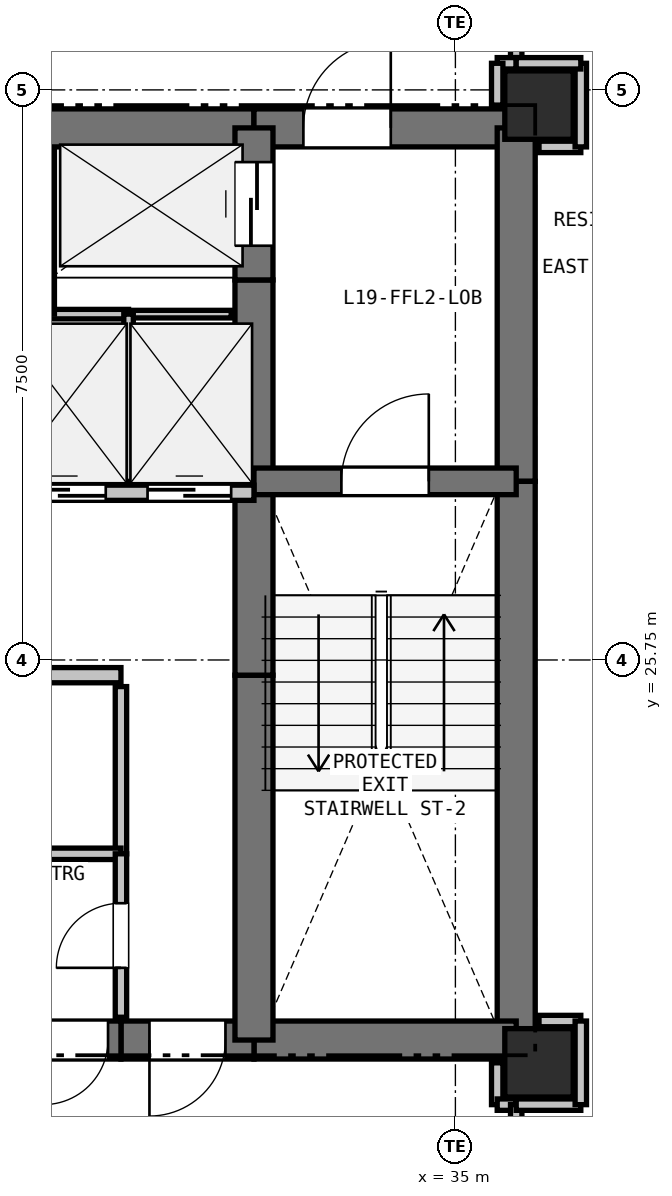
"""IFC4 building model, lengths in metres.
Left out: names, types, materials, properties, quantities, classifications, styles, units other than length and angle.
Written with IfcOpenShell. Run it as: python <this file> out.ifc"""

import sys

from ifc_helpers import new_model, si_unit, direction, frame, frame_2d, origin, origin_2d, place, context, subcontext, project, spatial, rectangle, extrude, element, fill, save


model = new_model("IFC4")
c1 = context("Model", 3, precision=1e-05, world=origin(), true_north=direction((0.0, 1.0)))
c2 = subcontext(c1, "Body", "Model", "MODEL_VIEW")
j1 = project(units=[si_unit("LENGTHUNIT", "METRE"), si_unit("PLANEANGLEUNIT", "RADIAN")], contexts=[c1])
p1 = place(None, origin())
s1 = spatial("IfcSite", under=j1, at=p1, CompositionType="ELEMENT")
p2 = place(p1, origin())
s2 = spatial("IfcBuilding", under=s1, at=p2, CompositionType="ELEMENT")
p3 = place(p2, frame((0.0, 0.0, 73.5)))
s3 = spatial("IfcBuildingStorey", under=s2, at=p3, CompositionType="ELEMENT", Elevation=73.5)
for number, where, z_axis, x_axis in (
    (1, (36.1, 33.05, 0.0), (0.0, 0.0, 1.0), (1.0, 0.0, 0.0)),
    (2, (36.1, 20.45, 0.0), (0.0, 0.0, 1.0), (1.0, 0.0, 0.0)),
):
    element("IfcColumn", number, at=place(p3, frame(where, z_axis=z_axis, x_axis=x_axis)), inside=s3, PredefinedType="COLUMN", context=c2, shape_type="SweptSolid", body=[
        extrude(rectangle(XDim=0.9, YDim=0.9, at=origin_2d()), origin(), (0.0, 0.0, 1.0), 3.3),
    ])
p4 = place(p3, frame((29.65, 32.75, 0.0), z_axis=(0.0, 0.0, 1.0), x_axis=(1.0, 0.0, 0.0)))
e3 = element("IfcWall", 3, at=p4, inside=s3, PredefinedType="SHEAR", context=c2, shape_type="SweptSolid", body=[
    extrude(rectangle(XDim=2.7, YDim=0.5, at=frame_2d((1.35, 0.0))), origin(), (0.0, 0.0, 1.0), 3.05),
])
p5 = place(p3, frame((32.35, 32.75, 0.0), z_axis=(0.0, 0.0, 1.0), x_axis=(1.0, 0.0, 0.0)))
e4 = element("IfcWall", 4, at=p5, inside=s3, PredefinedType="SHEAR", context=c2, shape_type="SweptSolid", body=[
    extrude(rectangle(XDim=3.45, YDim=0.5, at=frame_2d((1.725, 0.0))), origin(), (0.0, 0.0, 1.0), 3.05),
])
p6 = place(p5, frame((0.65, 0.0, 0.0)))
e5 = element("IfcOpeningElement", 5, at=p6, cuts=e4, PredefinedType="OPENING", context=c2, shape_type="SweptSolid", body=[
    extrude(rectangle(XDim=1.15, YDim=2.15, at=frame_2d((0.575, 1.075))), frame((0.0, 0.26, 0.0), z_axis=(0.0, -1.0, 0.0), x_axis=(1.0, 0.0, 0.0)), (0.0, 0.0, 1.0), 0.52),
])
p7 = place(p3, frame((35.8, 32.75, 0.0), z_axis=(0.0, 0.0, 1.0), x_axis=(0.0, -1.0, 0.0)))
e6 = element("IfcWall", 6, at=p7, inside=s3, PredefinedType="SHEAR", context=c2, shape_type="SweptSolid", body=[
    extrude(rectangle(XDim=4.65, YDim=0.5, at=frame_2d((2.325, 0.0))), origin(), (0.0, 0.0, 1.0), 3.05),
])
p8 = place(p3, frame((35.8, 28.1, 0.0), z_axis=(0.0, 0.0, 1.0), x_axis=(0.0, -1.0, 0.0)))
e7 = element("IfcWall", 7, at=p8, inside=s3, PredefinedType="SHEAR", context=c2, shape_type="SweptSolid", body=[
    extrude(rectangle(XDim=7.35, YDim=0.5, at=frame_2d((3.675, 0.0))), origin(), (0.0, 0.0, 1.0), 3.05),
])
p9 = place(p3, frame((35.8, 20.75, 0.0), z_axis=(0.0, 0.0, 1.0), x_axis=(-1.0, 0.0, 0.0)))
e8 = element("IfcWall", 8, at=p9, inside=s3, PredefinedType="SHEAR", context=c2, shape_type="SweptSolid", body=[
    extrude(rectangle(XDim=3.45, YDim=0.5, at=frame_2d((1.725, 0.0))), origin(), (0.0, 0.0, 1.0), 3.05),
])
p10 = place(p3, frame((32.35, 20.75, 0.0), z_axis=(0.0, 0.0, 1.0), x_axis=(-1.0, 0.0, 0.0)))
e9 = element("IfcWall", 9, at=p10, inside=s3, PredefinedType="SHEAR", context=c2, shape_type="SweptSolid", body=[
    extrude(rectangle(XDim=1.75, YDim=0.5, at=frame_2d((0.875, 0.0))), origin(), (0.0, 0.0, 1.0), 3.05),
])
p11 = place(p10, frame((0.375, 0.0, 0.0)))
e10 = element("IfcOpeningElement", 10, at=p11, cuts=e9, PredefinedType="OPENING", context=c2, shape_type="SweptSolid", body=[
    extrude(rectangle(XDim=1.0, YDim=2.15, at=frame_2d((0.5, 1.075))), frame((0.0, 0.26, 0.0), z_axis=(0.0, -1.0, 0.0), x_axis=(1.0, 0.0, 0.0)), (0.0, 0.0, 1.0), 0.52),
])
p12 = place(p3, frame((30.6, 20.75, 0.0), z_axis=(0.0, 0.0, 1.0), x_axis=(-1.0, 0.0, 0.0)))
e11 = element("IfcWall", 11, at=p12, inside=s3, PredefinedType="SHEAR", context=c2, shape_type="SweptSolid", body=[
    extrude(rectangle(XDim=2.25, YDim=0.5, at=frame_2d((1.125, 0.0))), origin(), (0.0, 0.0, 1.0), 3.05),
])
p13 = place(p12, frame((1.255, 0.0, 0.0)))
e12 = element("IfcOpeningElement", 12, at=p13, cuts=e11, PredefinedType="OPENING", context=c2, shape_type="SweptSolid", body=[
    extrude(rectangle(XDim=0.85, YDim=2.1, at=frame_2d((0.425, 1.05))), frame((0.0, 0.26, 0.0), z_axis=(0.0, -1.0, 0.0), x_axis=(1.0, 0.0, 0.0)), (0.0, 0.0, 1.0), 0.52),
])
p14 = place(p12, frame((0.17, 0.0, 0.0)))
e13 = element("IfcOpeningElement", 13, at=p14, cuts=e11, PredefinedType="OPENING", context=c2, shape_type="SweptSolid", body=[
    extrude(rectangle(XDim=0.85, YDim=2.1, at=frame_2d((0.425, 1.05))), frame((0.0, 0.26, 0.0), z_axis=(0.0, -1.0, 0.0), x_axis=(1.0, 0.0, 0.0)), (0.0, 0.0, 1.0), 0.52),
])
p15 = place(p3, frame((32.35, 20.75, 0.0), z_axis=(0.0, 0.0, 1.0), x_axis=(0.0, 1.0, 0.0)))
e14 = element("IfcWall", 14, at=p15, inside=s3, PredefinedType="SHEAR", context=c2, shape_type="SweptSolid", body=[
    extrude(rectangle(XDim=4.8, YDim=0.5, at=frame_2d((2.4, 0.0))), origin(), (0.0, 0.0, 1.0), 3.05),
])
p16 = place(p3, frame((32.35, 25.55, 0.0), z_axis=(0.0, 0.0, 1.0), x_axis=(0.0, 1.0, 0.0)))
e15 = element("IfcWall", 15, at=p16, inside=s3, PredefinedType="SHEAR", context=c2, shape_type="SweptSolid", body=[
    extrude(rectangle(XDim=2.4, YDim=0.5, at=frame_2d((1.2, 0.0))), origin(), (0.0, 0.0, 1.0), 3.05),
])
p17 = place(p3, frame((32.35, 27.95, 0.0), z_axis=(0.0, 0.0, 1.0), x_axis=(0.0, 1.0, 0.0)))
e16 = element("IfcWall", 16, at=p17, inside=s3, PredefinedType="SHEAR", context=c2, shape_type="SweptSolid", body=[
    extrude(rectangle(XDim=2.8, YDim=0.5, at=frame_2d((1.4, 0.0))), origin(), (0.0, 0.0, 1.0), 3.05),
])
p18 = place(p3, frame((32.35, 30.75, 0.0), z_axis=(0.0, 0.0, 1.0), x_axis=(0.0, 1.0, 0.0)))
e17 = element("IfcWall", 17, at=p18, inside=s3, PredefinedType="SHEAR", context=c2, shape_type="SweptSolid", body=[
    extrude(rectangle(XDim=2.0, YDim=0.5, at=frame_2d((1.0, 0.0))), origin(), (0.0, 0.0, 1.0), 3.05),
])
p19 = place(p18, frame((0.45, 0.0, 0.0)))
e18 = element("IfcOpeningElement", 18, at=p19, cuts=e17, PredefinedType="OPENING", context=c2, shape_type="SweptSolid", body=[
    extrude(rectangle(XDim=1.1, YDim=2.15, at=frame_2d((0.55, 1.075))), frame((0.0, 0.26, 0.0), z_axis=(0.0, -1.0, 0.0), x_axis=(1.0, 0.0, 0.0)), (0.0, 0.0, 1.0), 0.52),
])
p20 = place(p3, frame((32.35, 28.1, 0.0), z_axis=(0.0, 0.0, 1.0), x_axis=(1.0, 0.0, 0.0)))
e19 = element("IfcWall", 19, at=p20, inside=s3, PredefinedType="SHEAR", context=c2, shape_type="SweptSolid", body=[
    extrude(rectangle(XDim=3.45, YDim=0.35, at=frame_2d((1.725, 0.0))), origin(), (0.0, 0.0, 1.0), 3.05),
])
p21 = place(p20, frame((1.15, 0.0, 0.0)))
e20 = element("IfcOpeningElement", 20, at=p21, cuts=e19, PredefinedType="OPENING", context=c2, shape_type="SweptSolid", body=[
    extrude(rectangle(XDim=1.15, YDim=2.15, at=frame_2d((0.575, 1.075))), frame((0.0, 0.185, 0.0), z_axis=(0.0, -1.0, 0.0), x_axis=(1.0, 0.0, 0.0)), (0.0, 0.0, 1.0), 0.37),
])
p22 = place(p3, frame((25.65, 25.55, 0.0), z_axis=(0.0, 0.0, 1.0), x_axis=(1.0, 0.0, 0.0)))
e21 = element("IfcWall", 21, at=p22, inside=s3, PredefinedType="PARTITIONING", context=c2, shape_type="SweptSolid", body=[
    extrude(rectangle(XDim=4.95, YDim=0.2, at=frame_2d((2.475, 0.0))), origin(), (0.0, 0.0, 1.0), 3.05),
])
p23 = place(p3, frame((27.4, 27.95, 0.0), z_axis=(0.0, 0.0, 1.0), x_axis=(1.0, 0.0, 0.0)))
e22 = element("IfcWall", 22, at=p23, inside=s3, PredefinedType="PARTITIONING", context=c2, shape_type="SweptSolid", body=[
    extrude(rectangle(XDim=4.95, YDim=0.2, at=frame_2d((2.475, 0.0))), origin(), (0.0, 0.0, 1.0), 3.05),
])
p24 = place(p23, frame((0.25, 0.0, 0.0)))
e23 = element("IfcOpeningElement", 23, at=p24, cuts=e22, PredefinedType="OPENING", context=c2, shape_type="SweptSolid", body=[
    extrude(rectangle(XDim=1.1, YDim=2.15, at=frame_2d((0.55, 1.075))), frame((0.0, 0.11, 0.0), z_axis=(0.0, -1.0, 0.0), x_axis=(1.0, 0.0, 0.0)), (0.0, 0.0, 1.0), 0.22),
])
p25 = place(p23, frame((1.9, 0.0, 0.0)))
e24 = element("IfcOpeningElement", 24, at=p25, cuts=e22, PredefinedType="OPENING", context=c2, shape_type="SweptSolid", body=[
    extrude(rectangle(XDim=1.1, YDim=2.15, at=frame_2d((0.55, 1.075))), frame((0.0, 0.11, 0.0), z_axis=(0.0, -1.0, 0.0), x_axis=(1.0, 0.0, 0.0)), (0.0, 0.0, 1.0), 0.22),
])
p26 = place(p23, frame((3.55, 0.0, 0.0)))
e25 = element("IfcOpeningElement", 25, at=p26, cuts=e22, PredefinedType="OPENING", context=c2, shape_type="SweptSolid", body=[
    extrude(rectangle(XDim=1.1, YDim=2.15, at=frame_2d((0.55, 1.075))), frame((0.0, 0.11, 0.0), z_axis=(0.0, -1.0, 0.0), x_axis=(1.0, 0.0, 0.0)), (0.0, 0.0, 1.0), 0.22),
])
p27 = place(p3, frame((32.05, 30.3, 0.0), z_axis=(0.0, 0.0, 1.0), x_axis=(-1.0, 0.0, 0.0)))
e26 = element("IfcWall", 26, at=p27, inside=s3, PredefinedType="PARTITIONING", context=c2, shape_type="SweptSolid", body=[
    extrude(rectangle(XDim=1.35, YDim=0.1, at=frame_2d((0.675, 0.0))), origin(), (0.0, 0.0, 1.0), 3.05),
])
p28 = place(p3, frame((30.7, 30.3, 0.0), z_axis=(0.0, 0.0, 1.0), x_axis=(-1.0, 0.0, 0.0)))
e27 = element("IfcWall", 27, at=p28, inside=s3, PredefinedType="PARTITIONING", context=c2, shape_type="SweptSolid", body=[
    extrude(rectangle(XDim=1.05, YDim=0.125, at=frame_2d((0.525, 0.0))), origin(), (0.0, 0.0, 1.0), 3.05),
])
p29 = place(p3, frame((29.65, 30.3, 0.0), z_axis=(0.0, 0.0, 1.0), x_axis=(0.0, 1.0, 0.0)))
e28 = element("IfcWall", 28, at=p29, inside=s3, PredefinedType="PARTITIONING", context=c2, shape_type="SweptSolid", body=[
    extrude(rectangle(XDim=2.15, YDim=0.15, at=frame_2d((1.075, 0.0))), origin(), (0.0, 0.0, 1.0), 3.05),
])
p30 = place(p3, frame((30.6, 25.4, 0.0), z_axis=(0.0, 0.0, 1.0), x_axis=(0.0, -1.0, 0.0)))
e29 = element("IfcWall", 29, at=p30, inside=s3, PredefinedType="PARTITIONING", context=c2, shape_type="SweptSolid", body=[
    extrude(rectangle(XDim=2.2, YDim=0.15, at=frame_2d((1.1, 0.0))), origin(), (0.0, 0.0, 1.0), 3.05),
])
p31 = place(p3, frame((30.6, 23.2, 0.0), z_axis=(0.0, 0.0, 1.0), x_axis=(-1.0, 0.0, 0.0)))
e30 = element("IfcWall", 30, at=p31, inside=s3, PredefinedType="PARTITIONING", context=c2, shape_type="SweptSolid", body=[
    extrude(rectangle(XDim=1.15, YDim=0.15, at=frame_2d((0.575, 0.0))), origin(), (0.0, 0.0, 1.0), 3.05),
])
p32 = place(p3, frame((30.7, 30.3, 0.0), z_axis=(0.0, 0.0, 1.0), x_axis=(0.0, -1.0, 0.0)))
e31 = element("IfcWall", 31, at=p32, inside=s3, PredefinedType="PARTITIONING", context=c2, shape_type="SweptSolid", body=[
    extrude(rectangle(XDim=2.2, YDim=0.125, at=frame_2d((1.1, 0.0))), origin(), (0.0, 0.0, 1.0), 3.05),
])
p33 = place(p3, frame((30.6, 21.05, 0.0), z_axis=(0.0, 0.0, 1.0), x_axis=(0.0, 1.0, 0.0)))
e32 = element("IfcWall", 32, at=p33, inside=s3, PredefinedType="PARTITIONING", context=c2, shape_type="SweptSolid", body=[
    extrude(rectangle(XDim=2.15, YDim=0.15, at=frame_2d((1.075, 0.0))), origin(), (0.0, 0.0, 1.0), 3.05),
])
p34 = place(p33, frame((0.65, 0.0, 0.0)))
e33 = element("IfcOpeningElement", 33, at=p34, cuts=e32, PredefinedType="OPENING", context=c2, shape_type="SweptSolid", body=[
    extrude(rectangle(XDim=0.85, YDim=2.1, at=frame_2d((0.425, 1.05))), frame((0.0, 0.085, 0.0), z_axis=(0.0, -1.0, 0.0), x_axis=(1.0, 0.0, 0.0)), (0.0, 0.0, 1.0), 0.17),
])
p35 = place(p3, frame((35.55, 20.45, 0.0), z_axis=(0.0, 0.0, 1.0), x_axis=(0.0, -1.0, 0.0)))
e34 = element("IfcWall", 34, at=p35, inside=s3, PredefinedType="PARTITIONING", context=c2, shape_type="SweptSolid", body=[
    extrude(rectangle(XDim=0.55, YDim=0.15, at=frame_2d((0.275, 0.0))), origin(), (0.0, 0.0, 1.0), 2.498),
])
p36 = place(p3, frame((35.55, 19.9, 0.0), z_axis=(0.0, 0.0, 1.0), x_axis=(1.0, 0.0, 0.0)))
e35 = element("IfcWall", 35, at=p36, inside=s3, PredefinedType="PARTITIONING", context=c2, shape_type="SweptSolid", body=[
    extrude(rectangle(XDim=0.25, YDim=0.15, at=frame_2d((0.125, 0.0))), origin(), (0.0, 0.0, 1.0), 3.05),
])
p37 = place(p3, frame((35.8, 19.9, 0.0), z_axis=(0.0, 0.0, 1.0), x_axis=(0.0, -1.0, 0.0)))
e36 = element("IfcWall", 36, at=p37, inside=s3, PredefinedType="PARTITIONING", context=c2, shape_type="SweptSolid", body=[
    extrude(rectangle(XDim=1.75, YDim=0.15, at=frame_2d((0.875, 0.0))), origin(), (0.0, 0.0, 1.0), 3.05),
])
p38 = place(p37, frame((0.375, 0.0, 0.0)))
e37 = element("IfcOpeningElement", 37, at=p38, cuts=e36, PredefinedType="OPENING", context=c2, shape_type="SweptSolid", body=[
    extrude(rectangle(XDim=1.0, YDim=2.15, at=frame_2d((0.5, 1.075))), frame((0.0, 0.085, 0.0), z_axis=(0.0, -1.0, 0.0), x_axis=(1.0, 0.0, 0.0)), (0.0, 0.0, 1.0), 0.17),
])
p39 = place(p3, frame((35.8, 35.35, 0.0), z_axis=(0.0, 0.0, 1.0), x_axis=(0.0, -1.0, 0.0)))
e38 = element("IfcWall", 38, at=p39, inside=s3, PredefinedType="PARTITIONING", context=c2, shape_type="SweptSolid", body=[
    extrude(rectangle(XDim=1.75, YDim=0.15, at=frame_2d((0.875, 0.0))), origin(), (0.0, 0.0, 1.0), 3.05),
])
p40 = place(p39, frame((0.375, 0.0, 0.0)))
e39 = element("IfcOpeningElement", 39, at=p40, cuts=e38, PredefinedType="OPENING", context=c2, shape_type="SweptSolid", body=[
    extrude(rectangle(XDim=1.0, YDim=2.15, at=frame_2d((0.5, 1.075))), frame((0.0, 0.085, 0.0), z_axis=(0.0, -1.0, 0.0), x_axis=(1.0, 0.0, 0.0)), (0.0, 0.0, 1.0), 0.17),
])
p41 = place(p3, frame((35.8, 33.6, 0.0), z_axis=(0.0, 0.0, 1.0), x_axis=(-1.0, 0.0, 0.0)))
e40 = element("IfcWall", 40, at=p41, inside=s3, PredefinedType="PARTITIONING", context=c2, shape_type="SweptSolid", body=[
    extrude(rectangle(XDim=0.25, YDim=0.15, at=frame_2d((0.125, 0.0))), origin(), (0.0, 0.0, 1.0), 3.05),
])
p42 = place(p3, frame((35.55, 33.6, 0.0), z_axis=(0.0, 0.0, 1.0), x_axis=(0.0, -1.0, 0.0)))
e41 = element("IfcWall", 41, at=p42, inside=s3, PredefinedType="PARTITIONING", context=c2, shape_type="SweptSolid", body=[
    extrude(rectangle(XDim=0.55, YDim=0.15, at=frame_2d((0.275, 0.0))), origin(), (0.0, 0.0, 1.0), 2.498),
])
for number, where, z_axis, x_axis in (
    (42, (36.65, 21.0, 0.0), (0.0, 0.0, 1.0), (-1.0, 0.0, 0.0)),
    (43, (36.1, 32.5, 0.0), (0.0, 0.0, 1.0), (1.0, 0.0, 0.0)),
):
    element("IfcWall", number, at=place(p3, frame(where, z_axis=z_axis, x_axis=x_axis)), inside=s3, PredefinedType="PARTITIONING", context=c2, shape_type="SweptSolid", body=[
        extrude(rectangle(XDim=0.55, YDim=0.15, at=frame_2d((0.275, 0.0))), origin(), (0.0, 0.0, 1.0), 2.498),
    ])
p43 = place(p3, frame((36.65, 32.5, 0.0), z_axis=(0.0, 0.0, 1.0), x_axis=(0.0, 1.0, 0.0)))
e44 = element("IfcWall", 44, at=p43, inside=s3, PredefinedType="PARTITIONING", context=c2, shape_type="SweptSolid", body=[
    extrude(rectangle(XDim=1.1, YDim=0.15, at=frame_2d((0.55, 0.0))), origin(), (0.0, 0.0, 1.0), 2.423),
])
for number, where, z_axis, x_axis in (
    (45, (36.65, 33.6, 0.0), (0.0, 0.0, 1.0), (-1.0, 0.0, 0.0)),
    (46, (35.8, 19.9, 0.0), (0.0, 0.0, 1.0), (1.0, 0.0, 0.0)),
):
    element("IfcWall", number, at=place(p3, frame(where, z_axis=z_axis, x_axis=x_axis)), inside=s3, PredefinedType="PARTITIONING", context=c2, shape_type="SweptSolid", body=[
        extrude(rectangle(XDim=0.85, YDim=0.15, at=frame_2d((0.425, 0.0))), origin(), (0.0, 0.0, 1.0), 2.423),
    ])
p44 = place(p3, frame((36.65, 19.9, 0.0), z_axis=(0.0, 0.0, 1.0), x_axis=(0.0, 1.0, 0.0)))
e47 = element("IfcWall", 47, at=p44, inside=s3, PredefinedType="PARTITIONING", context=c2, shape_type="SweptSolid", body=[
    extrude(rectangle(XDim=1.1, YDim=0.15, at=frame_2d((0.55, 0.0))), origin(), (0.0, 0.0, 1.0), 3.05),
])
p45 = place(p25, origin())
e48 = element("IfcDoor", 48, at=p45, inside=s3, OperationType="SLIDING_TO_LEFT", PredefinedType="DOOR", context=c2, shape_type="SweptSolid", body=[
    extrude(rectangle(XDim=1.1, YDim=2.15, at=frame_2d((0.55, 1.075))), frame((0.0, 0.025, 0.0), z_axis=(0.0, -1.0, 0.0), x_axis=(1.0, 0.0, 0.0)), (0.0, 0.0, 1.0), 0.05),
])
fill(e24, e48)
p46 = place(p26, origin())
e49 = element("IfcDoor", 49, at=p46, inside=s3, OperationType="SLIDING_TO_LEFT", PredefinedType="DOOR", context=c2, shape_type="SweptSolid", body=[
    extrude(rectangle(XDim=1.1, YDim=2.15, at=frame_2d((0.55, 1.075))), frame((0.0, 0.025, 0.0), z_axis=(0.0, -1.0, 0.0), x_axis=(1.0, 0.0, 0.0)), (0.0, 0.0, 1.0), 0.05),
])
fill(e25, e49)
p47 = place(p11, origin())
e50 = element("IfcDoor", 50, at=p47, inside=s3, OperationType="SINGLE_SWING_RIGHT", PredefinedType="DOOR", context=c2, shape_type="SweptSolid", body=[
    extrude(rectangle(XDim=1.0, YDim=2.15, at=frame_2d((0.5, 1.075))), frame((0.0, 0.025, 0.0), z_axis=(0.0, -1.0, 0.0), x_axis=(1.0, 0.0, 0.0)), (0.0, 0.0, 1.0), 0.05),
])
fill(e10, e50)
p48 = place(p19, origin())
e51 = element("IfcDoor", 51, at=p48, inside=s3, OperationType="SLIDING_TO_LEFT", PredefinedType="DOOR", context=c2, shape_type="SweptSolid", body=[
    extrude(rectangle(XDim=1.1, YDim=2.15, at=frame_2d((0.55, 1.075))), frame((0.0, 0.025, 0.0), z_axis=(0.0, -1.0, 0.0), x_axis=(1.0, 0.0, 0.0)), (0.0, 0.0, 1.0), 0.05),
])
fill(e18, e51)
p49 = place(p21, origin())
e52 = element("IfcDoor", 52, at=p49, inside=s3, OperationType="SINGLE_SWING_RIGHT", PredefinedType="DOOR", context=c2, shape_type="SweptSolid", body=[
    extrude(rectangle(XDim=1.15, YDim=2.15, at=frame_2d((0.575, 1.075))), frame((0.0, 0.025, 0.0), z_axis=(0.0, -1.0, 0.0), x_axis=(1.0, 0.0, 0.0)), (0.0, 0.0, 1.0), 0.05),
])
fill(e20, e52)
p50 = place(p6, origin())
e53 = element("IfcDoor", 53, at=p50, inside=s3, OperationType="SINGLE_SWING_RIGHT", PredefinedType="DOOR", context=c2, shape_type="SweptSolid", body=[
    extrude(rectangle(XDim=1.15, YDim=2.15, at=frame_2d((0.575, 1.075))), frame((0.0, 0.025, 0.0), z_axis=(0.0, -1.0, 0.0), x_axis=(1.0, 0.0, 0.0)), (0.0, 0.0, 1.0), 0.05),
])
fill(e5, e53)
p51 = place(p34, origin())
e54 = element("IfcDoor", 54, at=p51, inside=s3, OperationType="SINGLE_SWING_LEFT", PredefinedType="DOOR", context=c2, shape_type="SweptSolid", body=[
    extrude(rectangle(XDim=0.85, YDim=2.1, at=frame_2d((0.425, 1.05))), frame((0.0, 0.025, 0.0), z_axis=(0.0, -1.0, 0.0), x_axis=(1.0, 0.0, 0.0)), (0.0, 0.0, 1.0), 0.05),
])
fill(e33, e54)
p52 = place(p14, origin())
e55 = element("IfcDoor", 55, at=p52, inside=s3, OperationType="SINGLE_SWING_RIGHT", PredefinedType="DOOR", context=c2, shape_type="SweptSolid", body=[
    extrude(rectangle(XDim=0.85, YDim=2.1, at=frame_2d((0.425, 1.05))), frame((0.0, 0.025, 0.0), z_axis=(0.0, -1.0, 0.0), x_axis=(1.0, 0.0, 0.0)), (0.0, 0.0, 1.0), 0.05),
])
fill(e13, e55)
save(model, sys.argv[1])
